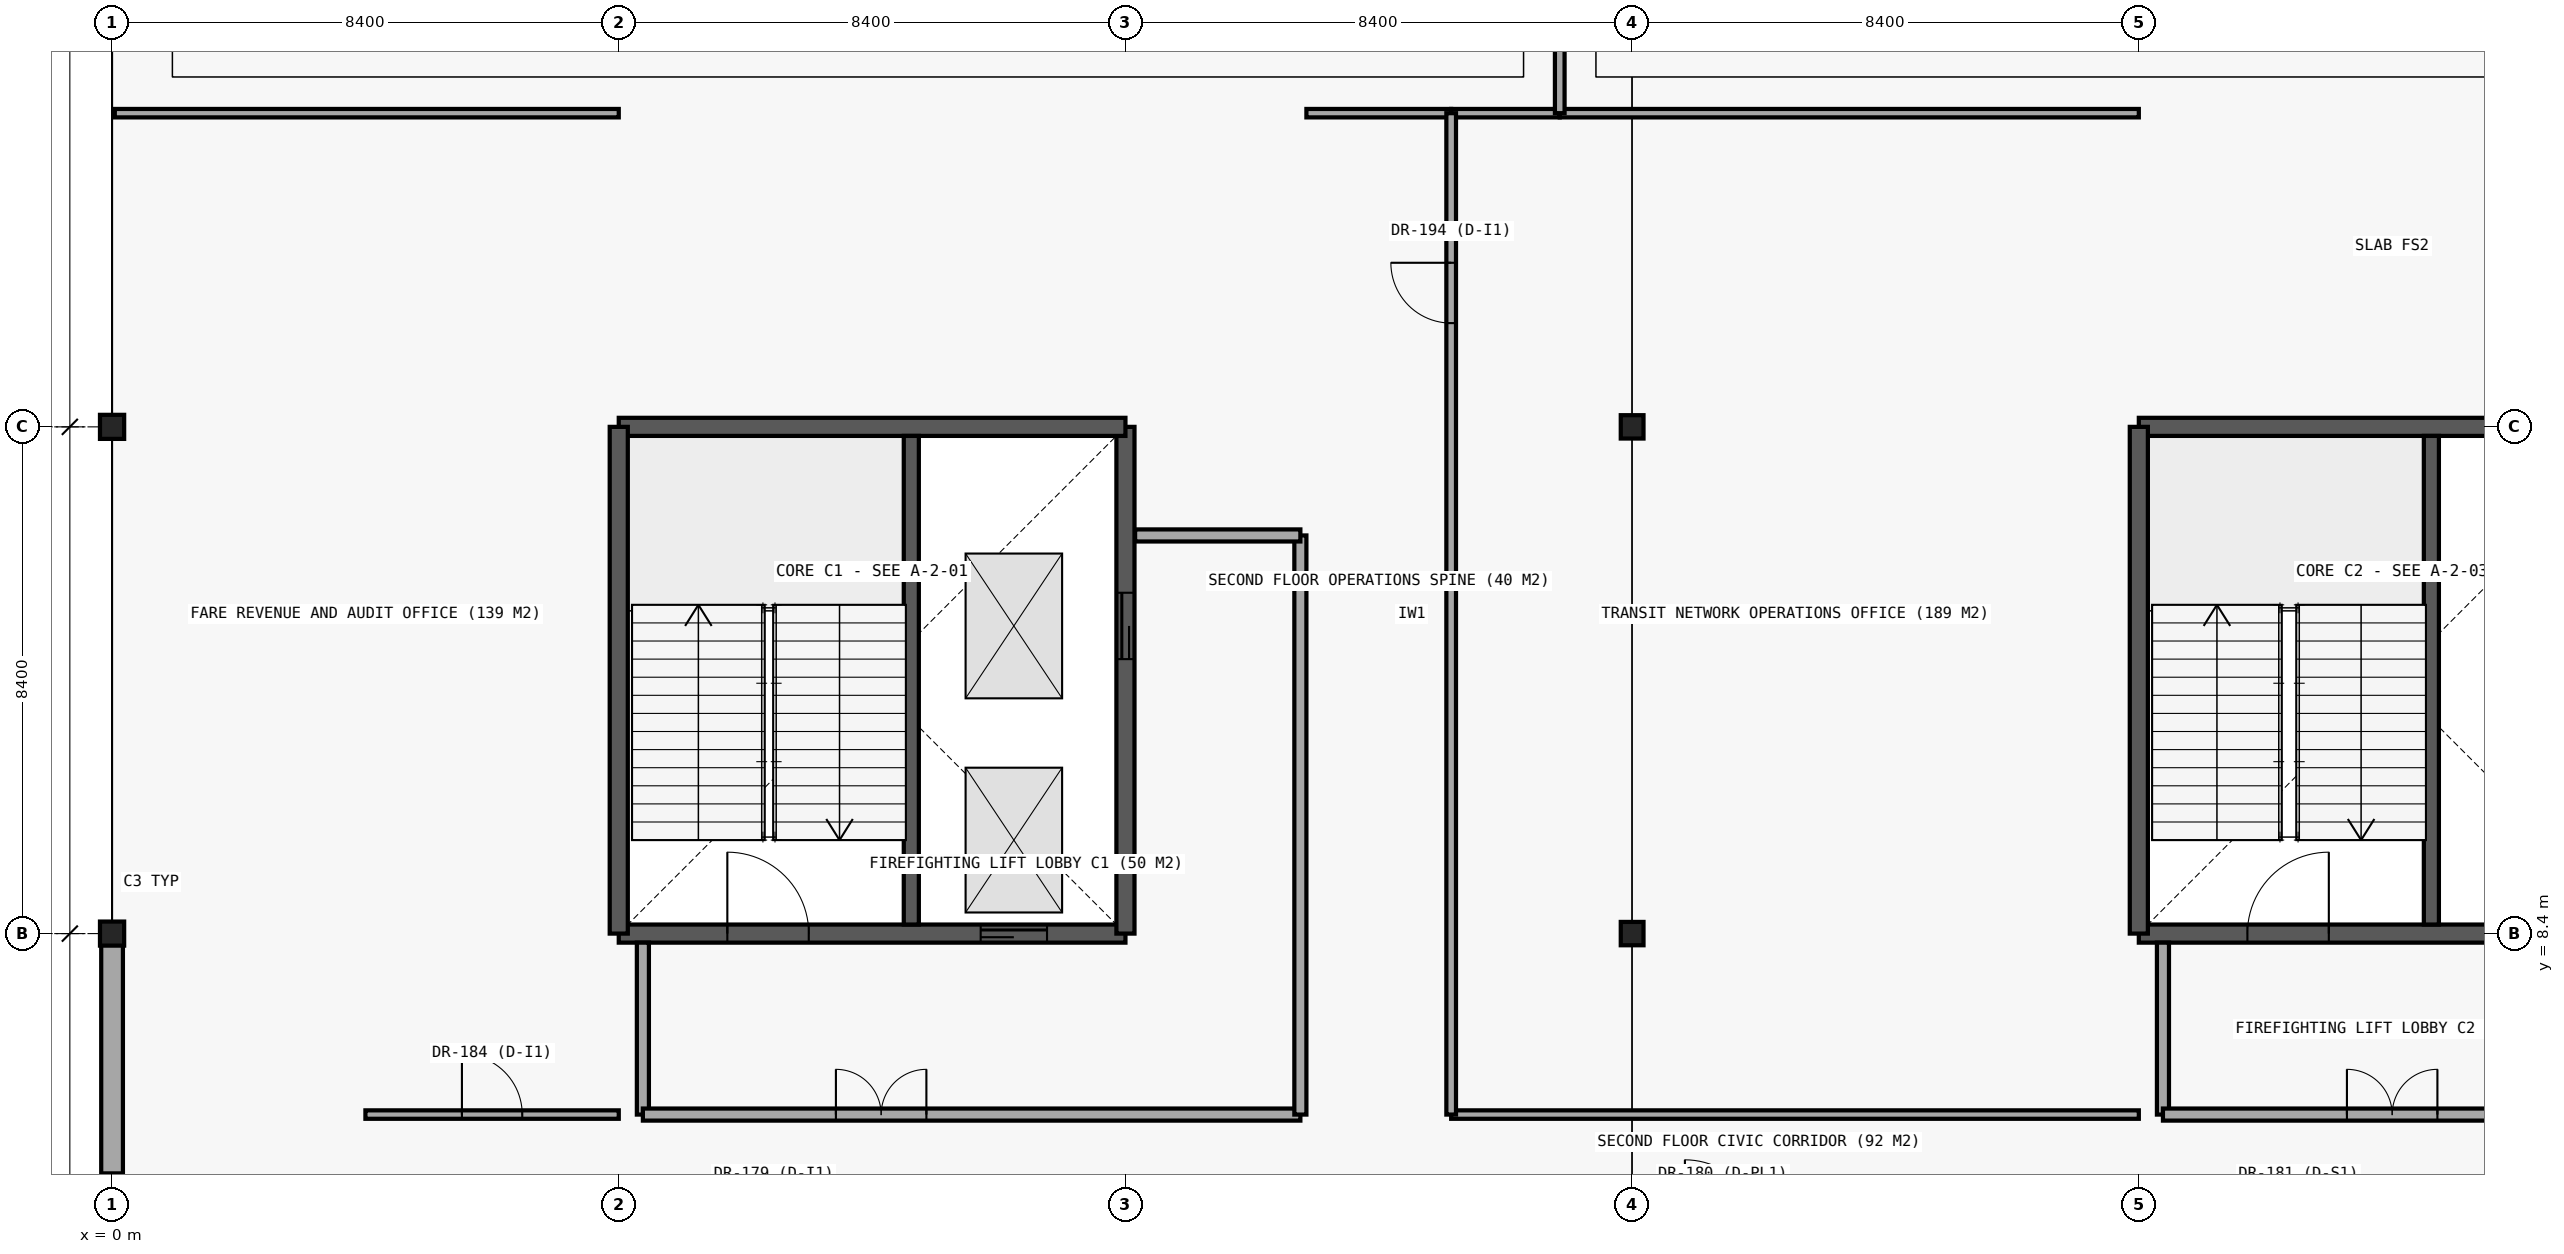
"""IFC4 building model, lengths in metres.
Left out: names, types, materials, properties, quantities, classifications, styles, units other than length and angle.
Written with IfcOpenShell. Run it as: python <this file> out.ifc"""

import sys

from ifc_helpers import new_model, si_unit, direction, frame, frame_2d, origin, origin_2d, place, context, subcontext, project, spatial, rectangle, i_section, extrude, element, fill, save


model = new_model("IFC4")
c1 = context("Model", 3, precision=1e-05, world=origin(), true_north=direction((0.0, 1.0)))
c2 = subcontext(c1, "Body", "Model", "MODEL_VIEW")
j1 = project(units=[si_unit("LENGTHUNIT", "METRE"), si_unit("PLANEANGLEUNIT", "RADIAN")], contexts=[c1])
p1 = place(None, origin())
s1 = spatial("IfcSite", under=j1, at=p1, CompositionType="ELEMENT")
p2 = place(p1, origin())
s2 = spatial("IfcBuilding", under=s1, at=p2, CompositionType="ELEMENT")
p3 = place(p2, frame((0.0, 0.0, 9.0)))
s3 = spatial("IfcBuildingStorey", under=s2, at=p3, CompositionType="ELEMENT", Elevation=9.0)
p4 = place(p3, frame((8.4, 8.4, 0.0), z_axis=(0.0, 0.0, 1.0), x_axis=(1.0, 0.0, 0.0)))
e1 = element("IfcWall", 1, at=p4, inside=s3, PredefinedType="SHEAR", context=c2, shape_type="SweptSolid", body=[
    extrude(rectangle(XDim=8.4, YDim=0.3, at=frame_2d((4.2, 0.0))), origin(), (0.0, 0.0, 1.0), 4.2),
])
p5 = place(p4, frame((1.8, 0.0, 0.0)))
e2 = element("IfcOpeningElement", 2, at=p5, cuts=e1, PredefinedType="OPENING", context=c2, shape_type="SweptSolid", body=[
    extrude(rectangle(XDim=1.35, YDim=2.2, at=frame_2d((0.675, 1.1))), frame((0.0, 0.16, 0.0), z_axis=(0.0, -1.0, 0.0), x_axis=(1.0, 0.0, 0.0)), (0.0, 0.0, 1.0), 0.32),
])
p6 = place(p4, frame((6.0, 0.0, 0.0)))
e3 = element("IfcOpeningElement", 3, at=p6, cuts=e1, PredefinedType="OPENING", context=c2, shape_type="SweptSolid", body=[
    extrude(rectangle(XDim=1.1, YDim=2.2, at=frame_2d((0.55, 1.1))), frame((0.0, 0.16, 0.0), z_axis=(0.0, -1.0, 0.0), x_axis=(1.0, 0.0, 0.0)), (0.0, 0.0, 1.0), 0.32),
])
p7 = place(p3, frame((16.8, 8.4, 0.0), z_axis=(0.0, 0.0, 1.0), x_axis=(0.0, 1.0, 0.0)))
e4 = element("IfcWall", 4, at=p7, inside=s3, PredefinedType="SHEAR", context=c2, shape_type="SweptSolid", body=[
    extrude(rectangle(XDim=8.4, YDim=0.3, at=frame_2d((4.2, 0.0))), origin(), (0.0, 0.0, 1.0), 4.2),
])
p8 = place(p7, frame((4.55, 0.0, 0.0)))
e5 = element("IfcOpeningElement", 5, at=p8, cuts=e4, PredefinedType="OPENING", context=c2, shape_type="SweptSolid", body=[
    extrude(rectangle(XDim=1.1, YDim=2.2, at=frame_2d((0.55, 1.1))), frame((0.0, 0.16, 0.0), z_axis=(0.0, -1.0, 0.0), x_axis=(1.0, 0.0, 0.0)), (0.0, 0.0, 1.0), 0.32),
])
for number, where, z_axis, x_axis in (
    (6, (16.8, 16.8, 0.0), (0.0, 0.0, 1.0), (-1.0, 0.0, 0.0)),
    (7, (8.4, 16.8, 0.0), (0.0, 0.0, 1.0), (0.0, -1.0, 0.0)),
):
    element("IfcWall", number, at=place(p3, frame(where, z_axis=z_axis, x_axis=x_axis)), inside=s3, PredefinedType="SHEAR", context=c2, shape_type="SweptSolid", body=[
        extrude(rectangle(XDim=8.4, YDim=0.3, at=frame_2d((4.2, 0.0))), origin(), (0.0, 0.0, 1.0), 4.2),
    ])
p9 = place(p3, frame((13.25, 8.55, 0.0), z_axis=(0.0, 0.0, 1.0), x_axis=(0.0, 1.0, 0.0)))
e8 = element("IfcWall", 8, at=p9, inside=s3, PredefinedType="SHEAR", context=c2, shape_type="SweptSolid", body=[
    extrude(rectangle(XDim=8.1, YDim=0.25, at=frame_2d((4.05, 0.0))), origin(), (0.0, 0.0, 1.0), 4.2),
])
p10 = place(p3, frame((33.6, 8.4, 0.0), z_axis=(0.0, 0.0, 1.0), x_axis=(1.0, 0.0, 0.0)))
e9 = element("IfcWall", 9, at=p10, inside=s3, PredefinedType="SHEAR", context=c2, shape_type="SweptSolid", body=[
    extrude(rectangle(XDim=8.4, YDim=0.3, at=frame_2d((4.2, 0.0))), origin(), (0.0, 0.0, 1.0), 4.2),
])
p11 = place(p10, frame((1.8, 0.0, 0.0)))
e10 = element("IfcOpeningElement", 10, at=p11, cuts=e9, PredefinedType="OPENING", context=c2, shape_type="SweptSolid", body=[
    extrude(rectangle(XDim=1.35, YDim=2.2, at=frame_2d((0.675, 1.1))), frame((0.0, 0.16, 0.0), z_axis=(0.0, -1.0, 0.0), x_axis=(1.0, 0.0, 0.0)), (0.0, 0.0, 1.0), 0.32),
])
p12 = place(p10, frame((6.0, 0.0, 0.0)))
e11 = element("IfcOpeningElement", 11, at=p12, cuts=e9, PredefinedType="OPENING", context=c2, shape_type="SweptSolid", body=[
    extrude(rectangle(XDim=1.1, YDim=2.2, at=frame_2d((0.55, 1.1))), frame((0.0, 0.16, 0.0), z_axis=(0.0, -1.0, 0.0), x_axis=(1.0, 0.0, 0.0)), (0.0, 0.0, 1.0), 0.32),
])
p13 = place(p3, frame((42.0, 16.8, 0.0), z_axis=(0.0, 0.0, 1.0), x_axis=(-1.0, 0.0, 0.0)))
e12 = element("IfcWall", 12, at=p13, inside=s3, PredefinedType="SHEAR", context=c2, shape_type="SweptSolid", body=[
    extrude(rectangle(XDim=8.4, YDim=0.3, at=frame_2d((4.2, 0.0))), origin(), (0.0, 0.0, 1.0), 4.2),
])
p14 = place(p3, frame((33.6, 16.8, 0.0), z_axis=(0.0, 0.0, 1.0), x_axis=(0.0, -1.0, 0.0)))
e13 = element("IfcWall", 13, at=p14, inside=s3, PredefinedType="SHEAR", context=c2, shape_type="SweptSolid", body=[
    extrude(rectangle(XDim=8.4, YDim=0.3, at=frame_2d((4.2, 0.0))), origin(), (0.0, 0.0, 1.0), 4.2),
])
p15 = place(p3, frame((38.45, 8.55, 0.0), z_axis=(0.0, 0.0, 1.0), x_axis=(0.0, 1.0, 0.0)))
e14 = element("IfcWall", 14, at=p15, inside=s3, PredefinedType="SHEAR", context=c2, shape_type="SweptSolid", body=[
    extrude(rectangle(XDim=8.1, YDim=0.25, at=frame_2d((4.05, 0.0))), origin(), (0.0, 0.0, 1.0), 4.2),
])
for number, where, z_axis, x_axis in (
    (15, (0.0, 8.4, 0.0), (0.0, 0.0, 1.0), (1.0, 0.0, 0.0)),
    (16, (0.0, 16.8, 0.0), (0.0, 0.0, 1.0), (1.0, 0.0, 0.0)),
):
    element("IfcColumn", number, at=place(p3, frame(where, z_axis=z_axis, x_axis=x_axis)), inside=s3, PredefinedType="COLUMN", context=c2, shape_type="SweptSolid", body=[
        extrude(i_section(OverallWidth=0.401, OverallDepth=0.399, WebThickness=0.025, FlangeThickness=0.04, FilletRadius=0.015, at=origin_2d()), origin(), (0.0, 0.0, 1.0), 4.2),
    ])
for number, where, z_axis, x_axis in (
    (17, (25.2, 8.4, 0.0), (0.0, 0.0, 1.0), (1.0, 0.0, 0.0)),
    (18, (25.2, 16.8, 0.0), (0.0, 0.0, 1.0), (1.0, 0.0, 0.0)),
):
    element("IfcColumn", number, at=place(p3, frame(where, z_axis=z_axis, x_axis=x_axis)), inside=s3, PredefinedType="COLUMN", context=c2, shape_type="SweptSolid", body=[
        extrude(i_section(OverallWidth=0.377, OverallDepth=0.387, WebThickness=0.022, FlangeThickness=0.036, FilletRadius=0.015, at=origin_2d()), origin(), (0.0, 0.0, 1.0), 4.2),
    ])
p16 = place(p3, frame((0.0, 4.2, 0.0), z_axis=(0.0, 0.0, 1.0), x_axis=(1.0, 0.0, 0.0)))
e19 = element("IfcColumn", 19, at=p16, inside=s3, PredefinedType="COLUMN", context=c2, shape_type="SweptSolid", body=[
    extrude(i_section(OverallWidth=0.3, OverallDepth=0.45, WebThickness=0.014, FlangeThickness=0.026, FilletRadius=0.027, at=origin_2d()), origin(), (0.0, 0.0, 1.0), 4.2),
])
p17 = place(p3, frame((0.0, 8.4, 0.0), z_axis=(0.0, 0.0, 1.0), x_axis=(0.0, -1.0, 0.0)))
e20 = element("IfcWall", 20, at=p17, inside=s3, PredefinedType="STANDARD", context=c2, shape_type="SweptSolid", body=[
    extrude(rectangle(XDim=4.2, YDim=0.36, at=frame_2d((2.1, 0.0))), origin(), (0.0, 0.0, 1.0), 3.62),
])
p18 = place(p3, frame((8.8, 5.4, 0.0), z_axis=(0.0, 0.0, 1.0), x_axis=(0.0, 1.0, 0.0)))
e21 = element("IfcWall", 21, at=p18, inside=s3, PredefinedType="PARTITIONING", context=c2, shape_type="SweptSolid", body=[
    extrude(rectangle(XDim=2.85, YDim=0.2, at=frame_2d((1.425, 0.0))), origin(), (0.0, 0.0, 1.0), 3.52),
])
p19 = place(p3, frame((8.8, 5.4, 0.0), z_axis=(0.0, 0.0, 1.0), x_axis=(1.0, 0.0, 0.0)))
e22 = element("IfcWall", 22, at=p19, inside=s3, PredefinedType="PARTITIONING", context=c2, shape_type="SweptSolid", body=[
    extrude(rectangle(XDim=10.9, YDim=0.2, at=frame_2d((5.45, 0.0))), origin(), (0.0, 0.0, 1.0), 3.52),
])
p20 = place(p19, frame((3.2, 0.0, 0.0)))
e23 = element("IfcOpeningElement", 23, at=p20, cuts=e22, PredefinedType="OPENING", context=c2, shape_type="SweptSolid", body=[
    extrude(rectangle(XDim=1.5, YDim=2.2, at=frame_2d((0.75, 1.1))), frame((0.0, 0.11, 0.0), z_axis=(0.0, -1.0, 0.0), x_axis=(1.0, 0.0, 0.0)), (0.0, 0.0, 1.0), 0.22),
])
p21 = place(p3, frame((19.7, 5.4, 0.0), z_axis=(0.0, 0.0, 1.0), x_axis=(0.0, 1.0, 0.0)))
e24 = element("IfcWall", 24, at=p21, inside=s3, PredefinedType="PARTITIONING", context=c2, shape_type="SweptSolid", body=[
    extrude(rectangle(XDim=9.6, YDim=0.2, at=frame_2d((4.8, 0.0))), origin(), (0.0, 0.0, 1.0), 3.52),
])
p22 = place(p3, frame((16.96, 15.0, 0.0), z_axis=(0.0, 0.0, 1.0), x_axis=(1.0, 0.0, 0.0)))
e25 = element("IfcWall", 25, at=p22, inside=s3, PredefinedType="PARTITIONING", context=c2, shape_type="SweptSolid", body=[
    extrude(rectangle(XDim=2.74, YDim=0.2, at=frame_2d((1.37, 0.0))), origin(), (0.0, 0.0, 1.0), 3.52),
])
p23 = place(p3, frame((34.0, 5.4, 0.0), z_axis=(0.0, 0.0, 1.0), x_axis=(0.0, 1.0, 0.0)))
e26 = element("IfcWall", 26, at=p23, inside=s3, PredefinedType="PARTITIONING", context=c2, shape_type="SweptSolid", body=[
    extrude(rectangle(XDim=2.85, YDim=0.2, at=frame_2d((1.425, 0.0))), origin(), (0.0, 0.0, 1.0), 3.49),
])
p24 = place(p3, frame((34.0, 5.4, 0.0), z_axis=(0.0, 0.0, 1.0), x_axis=(1.0, 0.0, 0.0)))
e27 = element("IfcWall", 27, at=p24, inside=s3, PredefinedType="PARTITIONING", context=c2, shape_type="SweptSolid", body=[
    extrude(rectangle(XDim=7.6, YDim=0.2, at=frame_2d((3.8, 0.0))), origin(), (0.0, 0.0, 1.0), 3.52),
])
p25 = place(p24, frame((3.05, 0.0, 0.0)))
e28 = element("IfcOpeningElement", 28, at=p25, cuts=e27, PredefinedType="OPENING", context=c2, shape_type="SweptSolid", body=[
    extrude(rectangle(XDim=1.5, YDim=2.2, at=frame_2d((0.75, 1.1))), frame((0.0, 0.11, 0.0), z_axis=(0.0, -1.0, 0.0), x_axis=(1.0, 0.0, 0.0)), (0.0, 0.0, 1.0), 0.22),
])
p26 = place(p3, frame((4.2, 5.4, 0.0), z_axis=(0.0, 0.0, 1.0), x_axis=(1.0, 0.0, 0.0)))
e29 = element("IfcWall", 29, at=p26, inside=s3, PredefinedType="PARTITIONING", context=c2, shape_type="SweptSolid", body=[
    extrude(rectangle(XDim=4.2, YDim=0.14, at=frame_2d((2.1, 0.0))), origin(), (0.0, 0.0, 1.0), 3.5),
])
p27 = place(p26, frame((1.6, 0.0, 0.0)))
e30 = element("IfcOpeningElement", 30, at=p27, cuts=e29, PredefinedType="OPENING", context=c2, shape_type="SweptSolid", body=[
    extrude(rectangle(XDim=1.0, YDim=2.15, at=frame_2d((0.5, 1.075))), frame((0.0, 0.08, 0.0), z_axis=(0.0, -1.0, 0.0), x_axis=(1.0, 0.0, 0.0)), (0.0, 0.0, 1.0), 0.16),
])
p28 = place(p3, frame((22.2, 5.4, 0.0), z_axis=(0.0, 0.0, 1.0), x_axis=(1.0, 0.0, 0.0)))
e31 = element("IfcWall", 31, at=p28, inside=s3, PredefinedType="PARTITIONING", context=c2, shape_type="SweptSolid", body=[
    extrude(rectangle(XDim=11.4, YDim=0.14, at=frame_2d((5.7, 0.0))), origin(), (0.0, 0.0, 1.0), 3.5),
])
p29 = place(p3, frame((0.045, 22.0, 0.0), z_axis=(0.0, 0.0, 1.0), x_axis=(1.0, 0.0, 0.0)))
e32 = element("IfcWall", 32, at=p29, inside=s3, PredefinedType="PARTITIONING", context=c2, shape_type="SweptSolid", body=[
    extrude(rectangle(XDim=8.355, YDim=0.14, at=frame_2d((4.177, 0.0))), origin(), (0.0, 0.0, 1.0), 3.5),
])
p30 = place(p3, frame((19.8, 22.0, 0.0), z_axis=(0.0, 0.0, 1.0), x_axis=(1.0, 0.0, 0.0)))
e33 = element("IfcWall", 33, at=p30, inside=s3, PredefinedType="PARTITIONING", context=c2, shape_type="SweptSolid", body=[
    extrude(rectangle(XDim=2.4, YDim=0.14, at=frame_2d((1.2, 0.0))), origin(), (0.0, 0.0, 1.0), 3.5),
])
p31 = place(p3, frame((22.2, 22.0, 0.0), z_axis=(0.0, 0.0, 1.0), x_axis=(1.0, 0.0, 0.0)))
e34 = element("IfcWall", 34, at=p31, inside=s3, PredefinedType="PARTITIONING", context=c2, shape_type="SweptSolid", body=[
    extrude(rectangle(XDim=1.8, YDim=0.14, at=frame_2d((0.9, 0.0))), origin(), (0.0, 0.0, 1.0), 3.5),
])
p32 = place(p3, frame((24.0, 22.0, 0.0), z_axis=(0.0, 0.0, 1.0), x_axis=(1.0, 0.0, 0.0)))
e35 = element("IfcWall", 35, at=p32, inside=s3, PredefinedType="PARTITIONING", context=c2, shape_type="SweptSolid", body=[
    extrude(rectangle(XDim=9.6, YDim=0.14, at=frame_2d((4.8, 0.0))), origin(), (0.0, 0.0, 1.0), 3.5),
])
p33 = place(p3, frame((22.2, 5.4, 0.0), z_axis=(0.0, 0.0, 1.0), x_axis=(0.0, 1.0, 0.0)))
e36 = element("IfcWall", 36, at=p33, inside=s3, PredefinedType="PARTITIONING", context=c2, shape_type="SweptSolid", body=[
    extrude(rectangle(XDim=16.6, YDim=0.16, at=frame_2d((8.3, 0.0))), origin(), (0.0, 0.0, 1.0), 3.5),
])
p34 = place(p33, frame((13.12, 0.0, 0.0)))
e37 = element("IfcOpeningElement", 37, at=p34, cuts=e36, PredefinedType="OPENING", context=c2, shape_type="SweptSolid", body=[
    extrude(rectangle(XDim=1.0, YDim=2.15, at=frame_2d((0.5, 1.075))), frame((0.0, 0.09, 0.0), z_axis=(0.0, -1.0, 0.0), x_axis=(1.0, 0.0, 0.0)), (0.0, 0.0, 1.0), 0.18),
])
p35 = place(p3, frame((24.0, 22.0, 0.0), z_axis=(0.0, 0.0, 1.0), x_axis=(0.0, 1.0, 0.0)))
e38 = element("IfcWall", 38, at=p35, inside=s3, PredefinedType="PARTITIONING", context=c2, shape_type="SweptSolid", body=[
    extrude(rectangle(XDim=20.0, YDim=0.16, at=frame_2d((10.0, 0.0))), origin(), (0.0, 0.0, 1.0), 3.5),
])
p36 = place(p35, frame((4.72, 0.0, 0.0)))
e39 = element("IfcOpeningElement", 39, at=p36, cuts=e38, PredefinedType="OPENING", context=c2, shape_type="SweptSolid", body=[
    extrude(rectangle(XDim=1.4, YDim=2.25, at=frame_2d((0.7, 1.125))), frame((0.0, 0.09, 0.0), z_axis=(0.0, -1.0, 0.0), x_axis=(1.0, 0.0, 0.0)), (0.0, 0.0, 1.0), 0.18),
])
p37 = place(p5, origin())
e40 = element("IfcDoor", 40, at=p37, inside=s3, OperationType="SINGLE_SWING_LEFT", PredefinedType="DOOR", context=c2, shape_type="SweptSolid", body=[
    extrude(rectangle(XDim=1.35, YDim=2.2, at=frame_2d((0.675, 1.1))), frame((0.0, 0.025, 0.0), z_axis=(0.0, -1.0, 0.0), x_axis=(1.0, 0.0, 0.0)), (0.0, 0.0, 1.0), 0.05),
])
fill(e2, e40)
p38 = place(p6, origin())
e41 = element("IfcDoor", 41, at=p38, inside=s3, OperationType="SLIDING_TO_LEFT", PredefinedType="DOOR", context=c2, shape_type="SweptSolid", body=[
    extrude(rectangle(XDim=1.1, YDim=2.2, at=frame_2d((0.55, 1.1))), frame((0.0, 0.025, 0.0), z_axis=(0.0, -1.0, 0.0), x_axis=(1.0, 0.0, 0.0)), (0.0, 0.0, 1.0), 0.05),
])
fill(e3, e41)
p39 = place(p8, origin())
e42 = element("IfcDoor", 42, at=p39, inside=s3, OperationType="SLIDING_TO_RIGHT", PredefinedType="DOOR", context=c2, shape_type="SweptSolid", body=[
    extrude(rectangle(XDim=1.1, YDim=2.2, at=frame_2d((0.55, 1.1))), frame((0.0, 0.025, 0.0), z_axis=(0.0, -1.0, 0.0), x_axis=(1.0, 0.0, 0.0)), (0.0, 0.0, 1.0), 0.05),
])
fill(e5, e42)
p40 = place(p20, origin())
e43 = element("IfcDoor", 43, at=p40, inside=s3, OperationType="DOUBLE_DOOR_SINGLE_SWING", PredefinedType="DOOR", context=c2, shape_type="SweptSolid", body=[
    extrude(rectangle(XDim=1.5, YDim=2.2, at=frame_2d((0.75, 1.1))), frame((0.0, 0.025, 0.0), z_axis=(0.0, -1.0, 0.0), x_axis=(1.0, 0.0, 0.0)), (0.0, 0.0, 1.0), 0.05),
])
fill(e23, e43)
p41 = place(p11, origin())
e44 = element("IfcDoor", 44, at=p41, inside=s3, OperationType="SINGLE_SWING_RIGHT", PredefinedType="DOOR", context=c2, shape_type="SweptSolid", body=[
    extrude(rectangle(XDim=1.35, YDim=2.2, at=frame_2d((0.675, 1.1))), frame((0.0, 0.025, 0.0), z_axis=(0.0, -1.0, 0.0), x_axis=(1.0, 0.0, 0.0)), (0.0, 0.0, 1.0), 0.05),
])
fill(e10, e44)
p42 = place(p25, origin())
e45 = element("IfcDoor", 45, at=p42, inside=s3, OperationType="DOUBLE_DOOR_SINGLE_SWING", PredefinedType="DOOR", context=c2, shape_type="SweptSolid", body=[
    extrude(rectangle(XDim=1.5, YDim=2.2, at=frame_2d((0.75, 1.1))), frame((0.0, 0.025, 0.0), z_axis=(0.0, -1.0, 0.0), x_axis=(1.0, 0.0, 0.0)), (0.0, 0.0, 1.0), 0.05),
])
fill(e28, e45)
p43 = place(p27, origin())
e46 = element("IfcDoor", 46, at=p43, inside=s3, OperationType="SINGLE_SWING_LEFT", PredefinedType="DOOR", context=c2, shape_type="SweptSolid", body=[
    extrude(rectangle(XDim=1.0, YDim=2.15, at=frame_2d((0.5, 1.075))), frame((0.0, 0.025, 0.0), z_axis=(0.0, -1.0, 0.0), x_axis=(1.0, 0.0, 0.0)), (0.0, 0.0, 1.0), 0.05),
])
fill(e30, e46)
p44 = place(p34, origin())
e47 = element("IfcDoor", 47, at=p44, inside=s3, OperationType="SINGLE_SWING_RIGHT", PredefinedType="DOOR", context=c2, shape_type="SweptSolid", body=[
    extrude(rectangle(XDim=1.0, YDim=2.15, at=frame_2d((0.5, 1.075))), frame((0.0, 0.025, 0.0), z_axis=(0.0, -1.0, 0.0), x_axis=(1.0, 0.0, 0.0)), (0.0, 0.0, 1.0), 0.05),
])
fill(e37, e47)
save(model, sys.argv[1])
